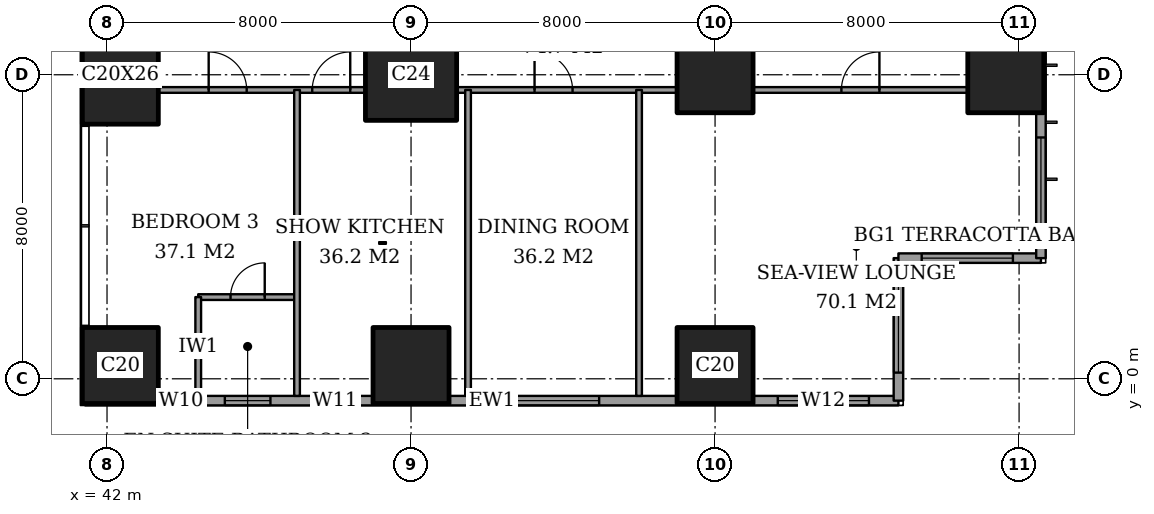
"""IFC4 building model, lengths in metres.
Left out: names, types, materials, properties, quantities, classifications, styles, units other than length and angle.
Written with IfcOpenShell. Run it as: python <this file> out.ifc"""

import sys

from ifc_helpers import new_model, si_unit, direction, frame, frame_2d, origin, origin_2d, place, context, subcontext, project, spatial, rectangle, extrude, element, fill, save


model = new_model("IFC4")
c1 = context("Model", 3, precision=1e-05, world=origin(), true_north=direction((0.0, 1.0)))
c2 = subcontext(c1, "Body", "Model", "MODEL_VIEW")
j1 = project(units=[si_unit("LENGTHUNIT", "METRE"), si_unit("PLANEANGLEUNIT", "RADIAN")], contexts=[c1])
p1 = place(None, origin())
s1 = spatial("IfcSite", under=j1, at=p1, CompositionType="ELEMENT")
p2 = place(p1, origin())
s2 = spatial("IfcBuilding", under=s1, at=p2, CompositionType="ELEMENT")
p3 = place(p2, frame((0.0, 0.0, 107.0)))
s3 = spatial("IfcBuildingStorey", under=s2, at=p3, CompositionType="ELEMENT", Elevation=107.0)
p4 = place(p3, frame((42.35, 0.35, 0.0), z_axis=(0.0, 0.0, 1.0), x_axis=(1.0, 0.0, 0.0)))
e1 = element("IfcColumn", 1, at=p4, inside=s3, PredefinedType="COLUMN", context=c2, shape_type="SweptSolid", body=[
    extrude(rectangle(XDim=2.0, YDim=2.0, at=origin_2d()), origin(), (0.0, 0.0, 1.0), 3.6),
])
p5 = place(p3, frame((42.35, 8.0, 0.0), z_axis=(0.0, 0.0, 1.0), x_axis=(1.0, 0.0, 0.0)))
e2 = element("IfcColumn", 2, at=p5, inside=s3, PredefinedType="COLUMN", context=c2, shape_type="SweptSolid", body=[
    extrude(rectangle(XDim=2.0, YDim=2.6, at=origin_2d()), origin(), (0.0, 0.0, 1.0), 3.6),
])
p6 = place(p3, frame((50.0, 0.35, 0.0), z_axis=(0.0, 0.0, 1.0), x_axis=(1.0, 0.0, 0.0)))
e3 = element("IfcColumn", 3, at=p6, inside=s3, PredefinedType="COLUMN", context=c2, shape_type="SweptSolid", body=[
    extrude(rectangle(XDim=2.0, YDim=2.0, at=origin_2d()), origin(), (0.0, 0.0, 1.0), 3.6),
])
p7 = place(p3, frame((50.0, 8.0, 0.0), z_axis=(0.0, 0.0, 1.0), x_axis=(1.0, 0.0, 0.0)))
e4 = element("IfcColumn", 4, at=p7, inside=s3, PredefinedType="COLUMN", context=c2, shape_type="SweptSolid", body=[
    extrude(rectangle(XDim=2.4, YDim=2.4, at=origin_2d()), origin(), (0.0, 0.0, 1.0), 3.6),
])
for number, where, z_axis, x_axis in (
    (5, (58.0, 0.35, 0.0), (0.0, 0.0, 1.0), (1.0, 0.0, 0.0)),
    (6, (58.0, 8.0, 0.0), (0.0, 0.0, 1.0), (1.0, 0.0, 0.0)),
    (7, (65.65, 8.0, 0.0), (0.0, 0.0, 1.0), (1.0, 0.0, 0.0)),
):
    element("IfcColumn", number, at=place(p3, frame(where, z_axis=z_axis, x_axis=x_axis)), inside=s3, PredefinedType="COLUMN", context=c2, shape_type="SweptSolid", body=[
        extrude(rectangle(XDim=2.0, YDim=2.0, at=origin_2d()), origin(), (0.0, 0.0, 1.0), 3.6),
    ])
p8 = place(p3, frame((41.425, -0.575, 0.0), z_axis=(0.0, 0.0, 1.0), x_axis=(1.0, 0.0, 0.0)))
e8 = element("IfcWall", 8, at=p8, inside=s3, PredefinedType="SOLIDWALL", context=c2, shape_type="SweptSolid", body=[
    extrude(rectangle(XDim=21.4, YDim=0.25, at=frame_2d((10.7, 0.0))), origin(), (0.0, 0.0, 1.0), 3.6),
])
p9 = place(p8, frame((2.225, 0.0, 0.4)))
e9 = element("IfcOpeningElement", 9, at=p9, cuts=e8, PredefinedType="OPENING", context=c2, shape_type="SweptSolid", body=[
    extrude(rectangle(XDim=0.6, YDim=2.2, at=frame_2d((0.3, 1.1))), frame((0.0, 0.135, 0.0), z_axis=(0.0, -1.0, 0.0), x_axis=(1.0, 0.0, 0.0)), (0.0, 0.0, 1.0), 0.27),
])
p10 = place(p8, frame((3.675, 0.0, 0.4)))
e10 = element("IfcOpeningElement", 10, at=p10, cuts=e8, PredefinedType="OPENING", context=c2, shape_type="SweptSolid", body=[
    extrude(rectangle(XDim=1.2, YDim=2.2, at=frame_2d((0.6, 1.1))), frame((0.0, 0.135, 0.0), z_axis=(0.0, -1.0, 0.0), x_axis=(1.0, 0.0, 0.0)), (0.0, 0.0, 1.0), 0.27),
])
p11 = place(p8, frame((5.975, 0.0, 0.4)))
e11 = element("IfcOpeningElement", 11, at=p11, cuts=e8, PredefinedType="OPENING", context=c2, shape_type="SweptSolid", body=[
    extrude(rectangle(XDim=1.2, YDim=2.2, at=frame_2d((0.6, 1.1))), frame((0.0, 0.135, 0.0), z_axis=(0.0, -1.0, 0.0), x_axis=(1.0, 0.0, 0.0)), (0.0, 0.0, 1.0), 0.27),
])
p12 = place(p8, frame((11.125, 0.0, 0.4)))
e12 = element("IfcOpeningElement", 12, at=p12, cuts=e8, PredefinedType="OPENING", context=c2, shape_type="SweptSolid", body=[
    extrude(rectangle(XDim=2.4, YDim=2.2, at=frame_2d((1.2, 1.1))), frame((0.0, 0.135, 0.0), z_axis=(0.0, -1.0, 0.0), x_axis=(1.0, 0.0, 0.0)), (0.0, 0.0, 1.0), 0.27),
])
p13 = place(p8, frame((18.225, 0.0, 0.4)))
e13 = element("IfcOpeningElement", 13, at=p13, cuts=e8, PredefinedType="OPENING", context=c2, shape_type="SweptSolid", body=[
    extrude(rectangle(XDim=2.4, YDim=2.2, at=frame_2d((1.2, 1.1))), frame((0.0, 0.135, 0.0), z_axis=(0.0, -1.0, 0.0), x_axis=(1.0, 0.0, 0.0)), (0.0, 0.0, 1.0), 0.27),
])
p14 = place(p3, frame((62.825, -0.575, 0.0), z_axis=(0.0, 0.0, 1.0), x_axis=(0.0, 1.0, 0.0)))
e14 = element("IfcWall", 14, at=p14, inside=s3, PredefinedType="SOLIDWALL", context=c2, shape_type="SweptSolid", body=[
    extrude(rectangle(XDim=3.75, YDim=0.25, at=frame_2d((1.875, 0.0))), origin(), (0.0, 0.0, 1.0), 3.6),
])
p15 = place(p14, frame((0.738, 0.0, 0.4)))
e15 = element("IfcOpeningElement", 15, at=p15, cuts=e14, PredefinedType="OPENING", context=c2, shape_type="SweptSolid", body=[
    extrude(rectangle(XDim=2.4, YDim=2.2, at=frame_2d((1.2, 1.1))), frame((0.0, 0.135, 0.0), z_axis=(0.0, -1.0, 0.0), x_axis=(1.0, 0.0, 0.0)), (0.0, 0.0, 1.0), 0.27),
])
p16 = place(p3, frame((62.825, 3.175, 0.0), z_axis=(0.0, 0.0, 1.0), x_axis=(1.0, 0.0, 0.0)))
e16 = element("IfcWall", 16, at=p16, inside=s3, PredefinedType="SOLIDWALL", context=c2, shape_type="SweptSolid", body=[
    extrude(rectangle(XDim=3.75, YDim=0.25, at=frame_2d((1.875, 0.0))), origin(), (0.0, 0.0, 1.0), 3.6),
])
p17 = place(p16, frame((0.613, 0.0, 0.4)))
e17 = element("IfcOpeningElement", 17, at=p17, cuts=e16, PredefinedType="OPENING", context=c2, shape_type="SweptSolid", body=[
    extrude(rectangle(XDim=2.4, YDim=2.2, at=frame_2d((1.2, 1.1))), frame((0.0, 0.135, 0.0), z_axis=(0.0, -1.0, 0.0), x_axis=(1.0, 0.0, 0.0)), (0.0, 0.0, 1.0), 0.27),
])
p18 = place(p3, frame((66.575, 3.175, 0.0), z_axis=(0.0, 0.0, 1.0), x_axis=(0.0, 1.0, 0.0)))
e18 = element("IfcWall", 18, at=p18, inside=s3, PredefinedType="SOLIDWALL", context=c2, shape_type="SweptSolid", body=[
    extrude(rectangle(XDim=41.65, YDim=0.25, at=frame_2d((20.825, 0.0))), origin(), (0.0, 0.0, 1.0), 3.6),
])
p19 = place(p18, frame((0.775, 0.0, 0.4)))
e19 = element("IfcOpeningElement", 19, at=p19, cuts=e18, PredefinedType="OPENING", context=c2, shape_type="SweptSolid", body=[
    extrude(rectangle(XDim=2.4, YDim=2.2, at=frame_2d((1.2, 1.1))), frame((0.0, 0.135, 0.0), z_axis=(0.0, -1.0, 0.0), x_axis=(1.0, 0.0, 0.0)), (0.0, 0.0, 1.0), 0.27),
])
p20 = place(p18, frame((6.1, 0.0, 0.4)))
e20 = element("IfcOpeningElement", 20, at=p20, cuts=e18, PredefinedType="OPENING", context=c2, shape_type="SweptSolid", body=[
    extrude(rectangle(XDim=1.2, YDim=2.2, at=frame_2d((0.6, 1.1))), frame((0.0, 0.135, 0.0), z_axis=(0.0, -1.0, 0.0), x_axis=(1.0, 0.0, 0.0)), (0.0, 0.0, 1.0), 0.27),
])
p21 = place(p18, frame((8.275, 0.0, 0.4)))
e21 = element("IfcOpeningElement", 21, at=p21, cuts=e18, PredefinedType="OPENING", context=c2, shape_type="SweptSolid", body=[
    extrude(rectangle(XDim=2.4, YDim=2.2, at=frame_2d((1.2, 1.1))), frame((0.0, 0.135, 0.0), z_axis=(0.0, -1.0, 0.0), x_axis=(1.0, 0.0, 0.0)), (0.0, 0.0, 1.0), 0.27),
])
p22 = place(p18, frame((15.775, 0.0, 0.4)))
e22 = element("IfcOpeningElement", 22, at=p22, cuts=e18, PredefinedType="OPENING", context=c2, shape_type="SweptSolid", body=[
    extrude(rectangle(XDim=2.4, YDim=2.2, at=frame_2d((1.2, 1.1))), frame((0.0, 0.135, 0.0), z_axis=(0.0, -1.0, 0.0), x_axis=(1.0, 0.0, 0.0)), (0.0, 0.0, 1.0), 0.27),
])
p23 = place(p18, frame((23.475, 0.0, 0.4)))
e23 = element("IfcOpeningElement", 23, at=p23, cuts=e18, PredefinedType="OPENING", context=c2, shape_type="SweptSolid", body=[
    extrude(rectangle(XDim=2.4, YDim=2.2, at=frame_2d((1.2, 1.1))), frame((0.0, 0.135, 0.0), z_axis=(0.0, -1.0, 0.0), x_axis=(1.0, 0.0, 0.0)), (0.0, 0.0, 1.0), 0.27),
])
p24 = place(p18, frame((30.975, 0.0, 0.4)))
e24 = element("IfcOpeningElement", 24, at=p24, cuts=e18, PredefinedType="OPENING", context=c2, shape_type="SweptSolid", body=[
    extrude(rectangle(XDim=2.4, YDim=2.2, at=frame_2d((1.2, 1.1))), frame((0.0, 0.135, 0.0), z_axis=(0.0, -1.0, 0.0), x_axis=(1.0, 0.0, 0.0)), (0.0, 0.0, 1.0), 0.27),
])
p25 = place(p18, frame((34.5, 0.0, 0.4)))
e25 = element("IfcOpeningElement", 25, at=p25, cuts=e18, PredefinedType="OPENING", context=c2, shape_type="SweptSolid", body=[
    extrude(rectangle(XDim=1.2, YDim=2.2, at=frame_2d((0.6, 1.1))), frame((0.0, 0.135, 0.0), z_axis=(0.0, -1.0, 0.0), x_axis=(1.0, 0.0, 0.0)), (0.0, 0.0, 1.0), 0.27),
])
p26 = place(p18, frame((38.475, 0.0, 0.4)))
e26 = element("IfcOpeningElement", 26, at=p26, cuts=e18, PredefinedType="OPENING", context=c2, shape_type="SweptSolid", body=[
    extrude(rectangle(XDim=2.4, YDim=2.2, at=frame_2d((1.2, 1.1))), frame((0.0, 0.135, 0.0), z_axis=(0.0, -1.0, 0.0), x_axis=(1.0, 0.0, 0.0)), (0.0, 0.0, 1.0), 0.27),
])
p27 = place(p3, frame((44.4, 2.15, 0.0), z_axis=(0.0, 0.0, 1.0), x_axis=(1.0, 0.0, 0.0)))
e27 = element("IfcWall", 27, at=p27, inside=s3, PredefinedType="PARTITIONING", context=c2, shape_type="SweptSolid", body=[
    extrude(rectangle(XDim=2.6, YDim=0.15, at=frame_2d((1.3, 0.0))), origin(), (0.0, 0.0, 1.0), 3.35),
])
p28 = place(p27, frame((0.85, 0.0, 0.0)))
e28 = element("IfcOpeningElement", 28, at=p28, cuts=e27, PredefinedType="OPENING", context=c2, shape_type="SweptSolid", body=[
    extrude(rectangle(XDim=0.9, YDim=2.1, at=frame_2d((0.45, 1.05))), frame((0.0, 0.085, 0.0), z_axis=(0.0, -1.0, 0.0), x_axis=(1.0, 0.0, 0.0)), (0.0, 0.0, 1.0), 0.17),
])
p29 = place(p3, frame((43.35, 7.6, 0.0), z_axis=(0.0, 0.0, 1.0), x_axis=(1.0, 0.0, 0.0)))
e29 = element("IfcWall", 29, at=p29, inside=s3, PredefinedType="PARTITIONING", context=c2, shape_type="SweptSolid", body=[
    extrude(rectangle(XDim=5.45, YDim=0.15, at=frame_2d((2.725, 0.0))), origin(), (0.0, 0.0, 1.0), 3.35),
])
p30 = place(p29, frame((4.05, 0.0, 0.0)))
e30 = element("IfcOpeningElement", 30, at=p30, cuts=e29, PredefinedType="OPENING", context=c2, shape_type="SweptSolid", body=[
    extrude(rectangle(XDim=1.0, YDim=2.1, at=frame_2d((0.5, 1.05))), frame((0.0, 0.085, 0.0), z_axis=(0.0, -1.0, 0.0), x_axis=(1.0, 0.0, 0.0)), (0.0, 0.0, 1.0), 0.17),
])
p31 = place(p29, frame((1.325, 0.0, 0.0)))
e31 = element("IfcOpeningElement", 31, at=p31, cuts=e29, PredefinedType="OPENING", context=c2, shape_type="SweptSolid", body=[
    extrude(rectangle(XDim=1.0, YDim=2.1, at=frame_2d((0.5, 1.05))), frame((0.0, 0.085, 0.0), z_axis=(0.0, -1.0, 0.0), x_axis=(1.0, 0.0, 0.0)), (0.0, 0.0, 1.0), 0.17),
])
p32 = place(p3, frame((51.2, 7.6, 0.0), z_axis=(0.0, 0.0, 1.0), x_axis=(1.0, 0.0, 0.0)))
e32 = element("IfcWall", 32, at=p32, inside=s3, PredefinedType="PARTITIONING", context=c2, shape_type="SweptSolid", body=[
    extrude(rectangle(XDim=5.8, YDim=0.15, at=frame_2d((2.9, 0.0))), origin(), (0.0, 0.0, 1.0), 3.35),
])
p33 = place(p32, frame((2.05, 0.0, 0.0)))
e33 = element("IfcOpeningElement", 33, at=p33, cuts=e32, PredefinedType="OPENING", context=c2, shape_type="SweptSolid", body=[
    extrude(rectangle(XDim=1.0, YDim=2.1, at=frame_2d((0.5, 1.05))), frame((0.0, 0.085, 0.0), z_axis=(0.0, -1.0, 0.0), x_axis=(1.0, 0.0, 0.0)), (0.0, 0.0, 1.0), 0.17),
])
p34 = place(p3, frame((59.0, 7.6, 0.0), z_axis=(0.0, 0.0, 1.0), x_axis=(1.0, 0.0, 0.0)))
e34 = element("IfcWall", 34, at=p34, inside=s3, PredefinedType="PARTITIONING", context=c2, shape_type="SweptSolid", body=[
    extrude(rectangle(XDim=5.65, YDim=0.15, at=frame_2d((2.825, 0.0))), origin(), (0.0, 0.0, 1.0), 3.35),
])
p35 = place(p34, frame((2.325, 0.0, 0.0)))
e35 = element("IfcOpeningElement", 35, at=p35, cuts=e34, PredefinedType="OPENING", context=c2, shape_type="SweptSolid", body=[
    extrude(rectangle(XDim=1.0, YDim=2.1, at=frame_2d((0.5, 1.05))), frame((0.0, 0.085, 0.0), z_axis=(0.0, -1.0, 0.0), x_axis=(1.0, 0.0, 0.0)), (0.0, 0.0, 1.0), 0.17),
])
p36 = place(p3, frame((44.4, -0.45, 0.0), z_axis=(0.0, 0.0, 1.0), x_axis=(0.0, 1.0, 0.0)))
e36 = element("IfcWall", 36, at=p36, inside=s3, PredefinedType="PARTITIONING", context=c2, shape_type="SweptSolid", body=[
    extrude(rectangle(XDim=2.6, YDim=0.15, at=frame_2d((1.3, 0.0))), origin(), (0.0, 0.0, 1.0), 3.35),
])
for number, where, z_axis, x_axis in (
    (37, (47.0, -0.45, 0.0), (0.0, 0.0, 1.0), (0.0, 1.0, 0.0)),
    (38, (51.5, -0.45, 0.0), (0.0, 0.0, 1.0), (0.0, 1.0, 0.0)),
    (39, (56.0, -0.45, 0.0), (0.0, 0.0, 1.0), (0.0, 1.0, 0.0)),
):
    element("IfcWall", number, at=place(p3, frame(where, z_axis=z_axis, x_axis=x_axis)), inside=s3, PredefinedType="PARTITIONING", context=c2, shape_type="SweptSolid", body=[
        extrude(rectangle(XDim=8.05, YDim=0.15, at=frame_2d((4.025, 0.0))), origin(), (0.0, 0.0, 1.0), 3.35),
    ])
p37 = place(p9, origin())
e40 = element("IfcWindow", 40, at=p37, inside=s3, PartitioningType="SINGLE_PANEL", PredefinedType="WINDOW", context=c2, shape_type="SweptSolid", body=[
    extrude(rectangle(XDim=0.6, YDim=2.2, at=frame_2d((0.3, 1.1))), frame((0.0, 0.03, 0.0), z_axis=(0.0, -1.0, 0.0), x_axis=(1.0, 0.0, 0.0)), (0.0, 0.0, 1.0), 0.06),
])
fill(e9, e40)
p38 = place(p10, origin())
e41 = element("IfcWindow", 41, at=p38, inside=s3, PartitioningType="SINGLE_PANEL", PredefinedType="WINDOW", context=c2, shape_type="SweptSolid", body=[
    extrude(rectangle(XDim=1.2, YDim=2.2, at=frame_2d((0.6, 1.1))), frame((0.0, 0.03, 0.0), z_axis=(0.0, -1.0, 0.0), x_axis=(1.0, 0.0, 0.0)), (0.0, 0.0, 1.0), 0.06),
])
fill(e10, e41)
p39 = place(p11, origin())
e42 = element("IfcWindow", 42, at=p39, inside=s3, PartitioningType="SINGLE_PANEL", PredefinedType="WINDOW", context=c2, shape_type="SweptSolid", body=[
    extrude(rectangle(XDim=1.2, YDim=2.2, at=frame_2d((0.6, 1.1))), frame((0.0, 0.03, 0.0), z_axis=(0.0, -1.0, 0.0), x_axis=(1.0, 0.0, 0.0)), (0.0, 0.0, 1.0), 0.06),
])
fill(e11, e42)
p40 = place(p12, origin())
e43 = element("IfcWindow", 43, at=p40, inside=s3, PartitioningType="SINGLE_PANEL", PredefinedType="WINDOW", context=c2, shape_type="SweptSolid", body=[
    extrude(rectangle(XDim=2.4, YDim=2.2, at=frame_2d((1.2, 1.1))), frame((0.0, 0.03, 0.0), z_axis=(0.0, -1.0, 0.0), x_axis=(1.0, 0.0, 0.0)), (0.0, 0.0, 1.0), 0.06),
])
fill(e12, e43)
p41 = place(p13, origin())
e44 = element("IfcWindow", 44, at=p41, inside=s3, PartitioningType="SINGLE_PANEL", PredefinedType="WINDOW", context=c2, shape_type="SweptSolid", body=[
    extrude(rectangle(XDim=2.4, YDim=2.2, at=frame_2d((1.2, 1.1))), frame((0.0, 0.03, 0.0), z_axis=(0.0, -1.0, 0.0), x_axis=(1.0, 0.0, 0.0)), (0.0, 0.0, 1.0), 0.06),
])
fill(e13, e44)
p42 = place(p15, origin())
e45 = element("IfcWindow", 45, at=p42, inside=s3, PartitioningType="SINGLE_PANEL", PredefinedType="WINDOW", context=c2, shape_type="SweptSolid", body=[
    extrude(rectangle(XDim=2.4, YDim=2.2, at=frame_2d((1.2, 1.1))), frame((0.0, 0.03, 0.0), z_axis=(0.0, -1.0, 0.0), x_axis=(1.0, 0.0, 0.0)), (0.0, 0.0, 1.0), 0.06),
])
fill(e15, e45)
p43 = place(p17, origin())
e46 = element("IfcWindow", 46, at=p43, inside=s3, PartitioningType="SINGLE_PANEL", PredefinedType="WINDOW", context=c2, shape_type="SweptSolid", body=[
    extrude(rectangle(XDim=2.4, YDim=2.2, at=frame_2d((1.2, 1.1))), frame((0.0, 0.03, 0.0), z_axis=(0.0, -1.0, 0.0), x_axis=(1.0, 0.0, 0.0)), (0.0, 0.0, 1.0), 0.06),
])
fill(e17, e46)
p44 = place(p19, origin())
e47 = element("IfcWindow", 47, at=p44, inside=s3, PartitioningType="SINGLE_PANEL", PredefinedType="WINDOW", context=c2, shape_type="SweptSolid", body=[
    extrude(rectangle(XDim=2.4, YDim=2.2, at=frame_2d((1.2, 1.1))), frame((0.0, 0.03, 0.0), z_axis=(0.0, -1.0, 0.0), x_axis=(1.0, 0.0, 0.0)), (0.0, 0.0, 1.0), 0.06),
])
fill(e19, e47)
p45 = place(p35, origin())
e48 = element("IfcDoor", 48, at=p45, inside=s3, OperationType="SINGLE_SWING_LEFT", PredefinedType="DOOR", context=c2, shape_type="SweptSolid", body=[
    extrude(rectangle(XDim=1.0, YDim=2.1, at=frame_2d((0.5, 1.05))), frame((0.0, 0.025, 0.0), z_axis=(0.0, -1.0, 0.0), x_axis=(1.0, 0.0, 0.0)), (0.0, 0.0, 1.0), 0.05),
])
fill(e35, e48)
p46 = place(p33, origin())
e49 = element("IfcDoor", 49, at=p46, inside=s3, OperationType="SINGLE_SWING_RIGHT", PredefinedType="DOOR", context=c2, shape_type="SweptSolid", body=[
    extrude(rectangle(XDim=1.0, YDim=2.1, at=frame_2d((0.5, 1.05))), frame((0.0, 0.025, 0.0), z_axis=(0.0, -1.0, 0.0), x_axis=(1.0, 0.0, 0.0)), (0.0, 0.0, 1.0), 0.05),
])
fill(e33, e49)
p47 = place(p30, origin())
e50 = element("IfcDoor", 50, at=p47, inside=s3, OperationType="SINGLE_SWING_LEFT", PredefinedType="DOOR", context=c2, shape_type="SweptSolid", body=[
    extrude(rectangle(XDim=1.0, YDim=2.1, at=frame_2d((0.5, 1.05))), frame((0.0, 0.025, 0.0), z_axis=(0.0, -1.0, 0.0), x_axis=(1.0, 0.0, 0.0)), (0.0, 0.0, 1.0), 0.05),
])
fill(e30, e50)
p48 = place(p28, origin())
e51 = element("IfcDoor", 51, at=p48, inside=s3, OperationType="SINGLE_SWING_LEFT", PredefinedType="DOOR", context=c2, shape_type="SweptSolid", body=[
    extrude(rectangle(XDim=0.9, YDim=2.1, at=frame_2d((0.45, 1.05))), frame((0.0, 0.025, 0.0), z_axis=(0.0, -1.0, 0.0), x_axis=(1.0, 0.0, 0.0)), (0.0, 0.0, 1.0), 0.05),
])
fill(e28, e51)
p49 = place(p31, origin())
e52 = element("IfcDoor", 52, at=p49, inside=s3, OperationType="SINGLE_SWING_RIGHT", PredefinedType="DOOR", context=c2, shape_type="SweptSolid", body=[
    extrude(rectangle(XDim=1.0, YDim=2.1, at=frame_2d((0.5, 1.05))), frame((0.0, 0.025, 0.0), z_axis=(0.0, -1.0, 0.0), x_axis=(1.0, 0.0, 0.0)), (0.0, 0.0, 1.0), 0.05),
])
fill(e31, e52)
save(model, sys.argv[1])
